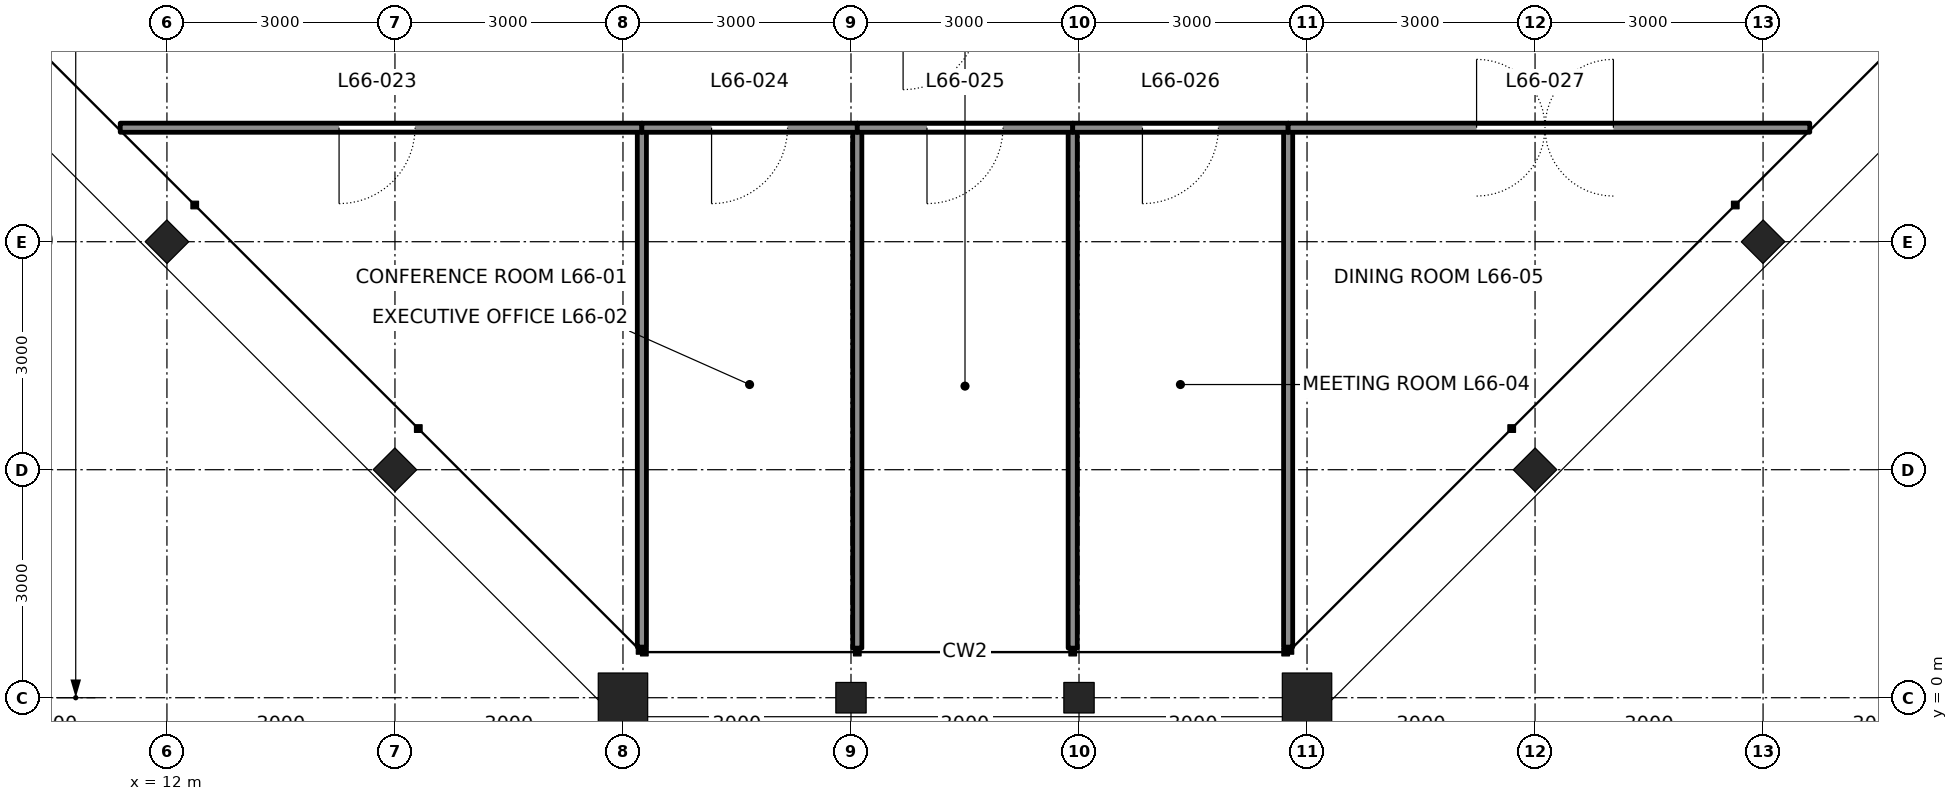
"""IFC4 building model, lengths in metres.
Left out: names, types, materials, properties, quantities, classifications, styles, units other than length and angle.
Written with IfcOpenShell. Run it as: python <this file> out.ifc"""

import sys

from ifc_helpers import new_model, si_unit, direction, frame, frame_2d, origin, origin_2d, place, context, subcontext, project, spatial, rectangle, hollow_rectangle, i_section, extrude, element, fill, save


model = new_model("IFC4")
c1 = context("Model", 3, precision=1e-05, world=origin(), true_north=direction((0.0, 1.0)))
c2 = subcontext(c1, "Body", "Model", "MODEL_VIEW")
j1 = project(units=[si_unit("LENGTHUNIT", "METRE"), si_unit("PLANEANGLEUNIT", "RADIAN")], contexts=[c1])
p1 = place(None, origin())
s1 = spatial("IfcSite", under=j1, at=p1, CompositionType="ELEMENT")
p2 = place(p1, origin())
s2 = spatial("IfcBuilding", under=s1, at=p2, CompositionType="ELEMENT")
p3 = place(p2, frame((0.0, 0.0, 295.8)))
s3 = spatial("IfcBuildingStorey", under=s2, at=p3, CompositionType="ELEMENT", Elevation=295.8)
p4 = place(p3, frame((18.0, 0.0, 0.0), z_axis=(0.0, 0.0, 1.0), x_axis=(0.0, -1.0, 0.0)))
e1 = element("IfcColumn", 1, at=p4, inside=s3, PredefinedType="COLUMN", context=c2, shape_type="SweptSolid", body=[
    extrude(hollow_rectangle(XDim=0.65, YDim=0.65, WallThickness=0.065, at=origin_2d()), origin(), (0.0, 0.0, 1.0), 4.2),
])
for number, where, z_axis, x_axis in (
    (2, (21.0, 0.0, 0.0), (0.0, 0.0, 1.0), (0.0, -1.0, 0.0)),
    (3, (24.0, 0.0, 0.0), (0.0, 0.0, 1.0), (0.0, -1.0, 0.0)),
):
    element("IfcColumn", number, at=place(p3, frame(where, z_axis=z_axis, x_axis=x_axis)), inside=s3, PredefinedType="COLUMN", context=c2, shape_type="SweptSolid", body=[
        extrude(i_section(OverallWidth=0.401, OverallDepth=0.399, WebThickness=0.025, FlangeThickness=0.04, at=origin_2d()), origin(), (0.0, 0.0, 1.0), 4.2),
    ])
p5 = place(p3, frame((27.0, 0.0, 0.0), z_axis=(0.0, 0.0, 1.0), x_axis=(0.0, -1.0, 0.0)))
e4 = element("IfcColumn", 4, at=p5, inside=s3, PredefinedType="COLUMN", context=c2, shape_type="SweptSolid", body=[
    extrude(hollow_rectangle(XDim=0.65, YDim=0.65, WallThickness=0.065, at=origin_2d()), origin(), (0.0, 0.0, 1.0), 4.2),
])
for number, where, z_axis, x_axis in (
    (5, (30.0, 3.0, 0.0), (0.0, 0.0, 1.0), (0.707, -0.707, 0.0)),
    (6, (33.0, 6.0, 0.0), (0.0, 0.0, 1.0), (0.707, -0.707, 0.0)),
    (7, (12.0, 6.0, 0.0), (0.0, 0.0, 1.0), (-0.707, -0.707, 0.0)),
    (8, (15.0, 3.0, 0.0), (0.0, 0.0, 1.0), (-0.707, -0.707, 0.0)),
):
    element("IfcColumn", number, at=place(p3, frame(where, z_axis=z_axis, x_axis=x_axis)), inside=s3, PredefinedType="COLUMN", context=c2, shape_type="SweptSolid", body=[
        extrude(i_section(OverallWidth=0.404, OverallDepth=0.406, WebThickness=0.027, FlangeThickness=0.044, at=origin_2d()), origin(), (0.0, 0.0, 1.0), 4.2),
    ])
p6 = place(p3, frame((18.249, 0.666, 0.0), z_axis=(0.0, 0.0, 1.0), x_axis=(0.0, 1.0, 0.0)))
e9 = element("IfcWall", 9, at=p6, inside=s3, PredefinedType="PARTITIONING", context=c2, shape_type="SweptSolid", body=[
    extrude(rectangle(XDim=6.834, YDim=0.12, at=frame_2d((3.417, 0.0))), origin(), (0.0, 0.0, 1.0), 4.04),
])
for number, where, z_axis, x_axis in (
    (10, (21.083, 0.653, 0.0), (0.0, 0.0, 1.0), (0.0, 1.0, 0.0)),
    (11, (23.917, 0.653, 0.0), (0.0, 0.0, 1.0), (0.0, 1.0, 0.0)),
):
    element("IfcWall", number, at=place(p3, frame(where, z_axis=z_axis, x_axis=x_axis)), inside=s3, PredefinedType="PARTITIONING", context=c2, shape_type="SweptSolid", body=[
        extrude(rectangle(XDim=6.847, YDim=0.12, at=frame_2d((3.424, 0.0))), origin(), (0.0, 0.0, 1.0), 3.278),
    ])
p7 = place(p3, frame((26.751, 0.666, 0.0), z_axis=(0.0, 0.0, 1.0), x_axis=(0.0, 1.0, 0.0)))
e12 = element("IfcWall", 12, at=p7, inside=s3, PredefinedType="PARTITIONING", context=c2, shape_type="SweptSolid", body=[
    extrude(rectangle(XDim=6.834, YDim=0.12, at=frame_2d((3.417, 0.0))), origin(), (0.0, 0.0, 1.0), 4.04),
])
p8 = place(p3, frame((11.385, 7.5, 0.0), z_axis=(0.0, 0.0, 1.0), x_axis=(1.0, 0.0, 0.0)))
e13 = element("IfcWall", 13, at=p8, inside=s3, PredefinedType="PARTITIONING", context=c2, shape_type="SweptSolid", body=[
    extrude(rectangle(XDim=6.863, YDim=0.12, at=frame_2d((3.432, 0.0))), origin(), (0.0, 0.0, 1.0), 4.04),
])
p9 = place(p8, frame((2.879, 0.0, 0.0)))
e14 = element("IfcOpeningElement", 14, at=p9, cuts=e13, PredefinedType="OPENING", context=c2, shape_type="SweptSolid", body=[
    extrude(rectangle(XDim=1.0, YDim=2.4, at=frame_2d((0.5, 1.2))), frame((0.0, 0.07, 0.0), z_axis=(0.0, -1.0, 0.0), x_axis=(1.0, 0.0, 0.0)), (0.0, 0.0, 1.0), 0.14),
])
p10 = place(p3, frame((18.249, 7.5, 0.0), z_axis=(0.0, 0.0, 1.0), x_axis=(1.0, 0.0, 0.0)))
e15 = element("IfcWall", 15, at=p10, inside=s3, PredefinedType="PARTITIONING", context=c2, shape_type="SweptSolid", body=[
    extrude(rectangle(XDim=2.834, YDim=0.12, at=frame_2d((1.417, 0.0))), origin(), (0.0, 0.0, 1.0), 4.04),
])
p11 = place(p10, frame((0.917, 0.0, 0.0)))
e16 = element("IfcOpeningElement", 16, at=p11, cuts=e15, PredefinedType="OPENING", context=c2, shape_type="SweptSolid", body=[
    extrude(rectangle(XDim=1.0, YDim=2.4, at=frame_2d((0.5, 1.2))), frame((0.0, 0.07, 0.0), z_axis=(0.0, -1.0, 0.0), x_axis=(1.0, 0.0, 0.0)), (0.0, 0.0, 1.0), 0.14),
])
p12 = place(p3, frame((21.083, 7.5, 0.0), z_axis=(0.0, 0.0, 1.0), x_axis=(1.0, 0.0, 0.0)))
e17 = element("IfcWall", 17, at=p12, inside=s3, PredefinedType="PARTITIONING", context=c2, shape_type="SweptSolid", body=[
    extrude(rectangle(XDim=2.834, YDim=0.12, at=frame_2d((1.417, 0.0))), origin(), (0.0, 0.0, 1.0), 4.04),
])
p13 = place(p12, frame((0.917, 0.0, 0.0)))
e18 = element("IfcOpeningElement", 18, at=p13, cuts=e17, PredefinedType="OPENING", context=c2, shape_type="SweptSolid", body=[
    extrude(rectangle(XDim=1.0, YDim=2.4, at=frame_2d((0.5, 1.2))), frame((0.0, 0.07, 0.0), z_axis=(0.0, -1.0, 0.0), x_axis=(1.0, 0.0, 0.0)), (0.0, 0.0, 1.0), 0.14),
])
p14 = place(p3, frame((23.917, 7.5, 0.0), z_axis=(0.0, 0.0, 1.0), x_axis=(1.0, 0.0, 0.0)))
e19 = element("IfcWall", 19, at=p14, inside=s3, PredefinedType="PARTITIONING", context=c2, shape_type="SweptSolid", body=[
    extrude(rectangle(XDim=2.834, YDim=0.12, at=frame_2d((1.417, 0.0))), origin(), (0.0, 0.0, 1.0), 4.04),
])
p15 = place(p14, frame((0.917, 0.0, 0.0)))
e20 = element("IfcOpeningElement", 20, at=p15, cuts=e19, PredefinedType="OPENING", context=c2, shape_type="SweptSolid", body=[
    extrude(rectangle(XDim=1.0, YDim=2.4, at=frame_2d((0.5, 1.2))), frame((0.0, 0.07, 0.0), z_axis=(0.0, -1.0, 0.0), x_axis=(1.0, 0.0, 0.0)), (0.0, 0.0, 1.0), 0.14),
])
p16 = place(p3, frame((26.751, 7.5, 0.0), z_axis=(0.0, 0.0, 1.0), x_axis=(1.0, 0.0, 0.0)))
e21 = element("IfcWall", 21, at=p16, inside=s3, PredefinedType="PARTITIONING", context=c2, shape_type="SweptSolid", body=[
    extrude(rectangle(XDim=6.863, YDim=0.12, at=frame_2d((3.432, 0.0))), origin(), (0.0, 0.0, 1.0), 4.04),
])
p17 = place(p16, frame((2.479, 0.0, 0.0)))
e22 = element("IfcOpeningElement", 22, at=p17, cuts=e21, PredefinedType="OPENING", context=c2, shape_type="SweptSolid", body=[
    extrude(rectangle(XDim=1.8, YDim=2.4, at=frame_2d((0.9, 1.2))), frame((0.0, 0.07, 0.0), z_axis=(0.0, -1.0, 0.0), x_axis=(1.0, 0.0, 0.0)), (0.0, 0.0, 1.0), 0.14),
])
p18 = place(p9, frame((1.0, 0.0, 0.0), z_axis=(0.0, 0.0, 1.0), x_axis=(-1.0, 0.0, 0.0)))
e23 = element("IfcDoor", 23, at=p18, inside=s3, OperationType="SINGLE_SWING_RIGHT", PredefinedType="DOOR", context=c2, shape_type="SweptSolid", body=[
    extrude(rectangle(XDim=1.0, YDim=2.4, at=frame_2d((0.5, 1.2))), frame((0.0, 0.025, 0.0), z_axis=(0.0, -1.0, 0.0), x_axis=(1.0, 0.0, 0.0)), (0.0, 0.0, 1.0), 0.05),
])
fill(e14, e23)
p19 = place(p11, frame((1.0, 0.0, 0.0), z_axis=(0.0, 0.0, 1.0), x_axis=(-1.0, 0.0, 0.0)))
e24 = element("IfcDoor", 24, at=p19, inside=s3, OperationType="SINGLE_SWING_RIGHT", PredefinedType="DOOR", context=c2, shape_type="SweptSolid", body=[
    extrude(rectangle(XDim=1.0, YDim=2.4, at=frame_2d((0.5, 1.2))), frame((0.0, 0.025, 0.0), z_axis=(0.0, -1.0, 0.0), x_axis=(1.0, 0.0, 0.0)), (0.0, 0.0, 1.0), 0.05),
])
fill(e16, e24)
p20 = place(p13, frame((1.0, 0.0, 0.0), z_axis=(0.0, 0.0, 1.0), x_axis=(-1.0, 0.0, 0.0)))
e25 = element("IfcDoor", 25, at=p20, inside=s3, OperationType="SINGLE_SWING_RIGHT", PredefinedType="DOOR", context=c2, shape_type="SweptSolid", body=[
    extrude(rectangle(XDim=1.0, YDim=2.4, at=frame_2d((0.5, 1.2))), frame((0.0, 0.025, 0.0), z_axis=(0.0, -1.0, 0.0), x_axis=(1.0, 0.0, 0.0)), (0.0, 0.0, 1.0), 0.05),
])
fill(e18, e25)
p21 = place(p15, frame((1.0, 0.0, 0.0), z_axis=(0.0, 0.0, 1.0), x_axis=(-1.0, 0.0, 0.0)))
e26 = element("IfcDoor", 26, at=p21, inside=s3, OperationType="SINGLE_SWING_RIGHT", PredefinedType="DOOR", context=c2, shape_type="SweptSolid", body=[
    extrude(rectangle(XDim=1.0, YDim=2.4, at=frame_2d((0.5, 1.2))), frame((0.0, 0.025, 0.0), z_axis=(0.0, -1.0, 0.0), x_axis=(1.0, 0.0, 0.0)), (0.0, 0.0, 1.0), 0.05),
])
fill(e20, e26)
p22 = place(p17, origin())
e27 = element("IfcDoor", 27, at=p22, inside=s3, OperationType="DOUBLE_DOOR_DOUBLE_SWING", PredefinedType="DOOR", context=c2, shape_type="SweptSolid", body=[
    extrude(rectangle(XDim=1.8, YDim=2.4, at=frame_2d((0.9, 1.2))), frame((0.0, 0.025, 0.0), z_axis=(0.0, -1.0, 0.0), x_axis=(1.0, 0.0, 0.0)), (0.0, 0.0, 1.0), 0.05),
])
fill(e22, e27)
save(model, sys.argv[1])
